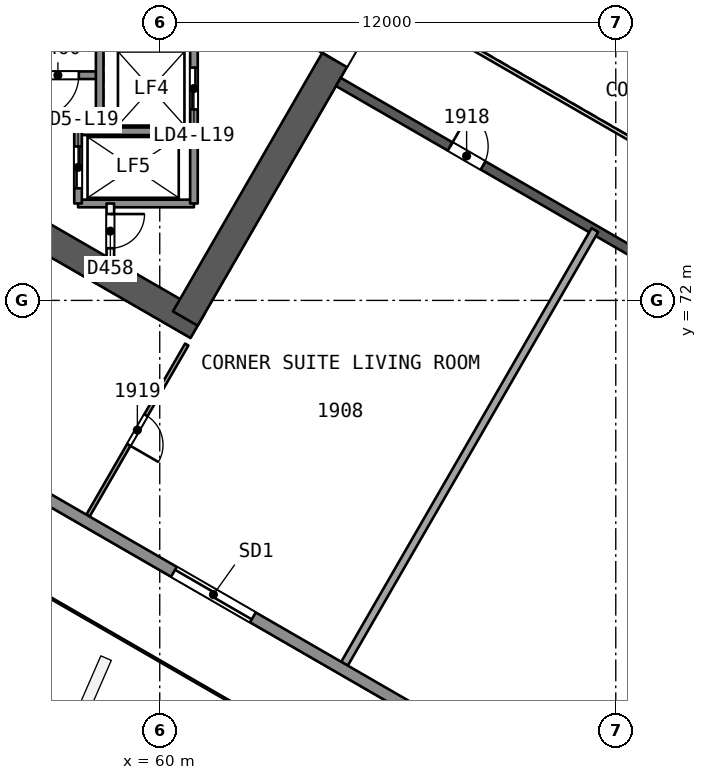
"""IFC4 building model, lengths in metres.
Left out: names, types, materials, properties, quantities, classifications, styles, units other than length and angle.
Written with IfcOpenShell. Run it as: python <this file> out.ifc"""

import sys

from ifc_helpers import new_model, si_unit, direction, frame, frame_2d, origin, place, context, subcontext, project, spatial, rectangle, extrude, element, fill, save


model = new_model("IFC4")
c1 = context("Model", 3, precision=1e-05, world=origin(), true_north=direction((0.0, 1.0)))
c2 = subcontext(c1, "Body", "Model", "MODEL_VIEW")
j1 = project(units=[si_unit("LENGTHUNIT", "METRE"), si_unit("PLANEANGLEUNIT", "RADIAN")], contexts=[c1])
p1 = place(None, origin())
s1 = spatial("IfcSite", under=j1, at=p1, CompositionType="ELEMENT")
p2 = place(p1, origin())
s2 = spatial("IfcBuilding", under=s1, at=p2, CompositionType="ELEMENT")
p3 = place(p2, frame((0.0, 0.0, 83.2)))
s3 = spatial("IfcBuildingStorey", under=s2, at=p3, CompositionType="ELEMENT", Elevation=83.2)
p4 = place(p3, frame((48.772, 78.394, 0.0), z_axis=(0.0, 0.0, 1.0), x_axis=(0.866028339916, -0.499994914436, 0.0)))
e1 = element("IfcWall", 1, at=p4, inside=s3, PredefinedType="SHEAR", context=c2, shape_type="SweptSolid", body=[
    extrude(rectangle(XDim=14.117, YDim=0.75, at=frame_2d((7.059, 0.0))), origin(), (0.0, 0.0, 1.0), 3.7),
])
p5 = place(p3, frame((60.673, 71.523, 0.0), z_axis=(0.0, 0.0, 1.0), x_axis=(0.499997052475, 0.866027105532, 0.0)))
e2 = element("IfcWall", 2, at=p5, inside=s3, PredefinedType="SHEAR", context=c2, shape_type="SweptSolid", body=[
    extrude(rectangle(XDim=10.005, YDim=0.75, at=frame_2d((5.002, 0.0))), origin(), (0.0, 0.0, 1.0), 3.7),
])
p6 = place(p5, frame((7.855, 0.0, 0.0)))
e3 = element("IfcOpeningElement", 3, at=p6, cuts=e2, PredefinedType="OPENING", context=c2, shape_type="SweptSolid", body=[
    extrude(rectangle(XDim=1.2, YDim=2.1, at=frame_2d((0.6, 1.05))), frame((0.0, 0.385, 0.0), z_axis=(0.0, -1.0, 0.0), x_axis=(1.0, 0.0, 0.0)), (0.0, 0.0, 1.0), 0.771),
])
p7 = place(p3, frame((64.7, 77.748, 0.0), z_axis=(0.0, 0.0, 1.0), x_axis=(0.866026492143, -0.499998114903, 0.0)))
e4 = element("IfcWall", 4, at=p7, inside=s3, PredefinedType="SHEAR", context=c2, shape_type="SweptSolid", body=[
    extrude(rectangle(XDim=15.588, YDim=0.25, at=frame_2d((7.794, 0.0))), origin(), (0.0, 0.0, 1.0), 3.2),
])
p8 = place(p7, frame((3.397, 0.0, 0.0)))
e5 = element("IfcOpeningElement", 5, at=p8, cuts=e4, PredefinedType="OPENING", context=c2, shape_type="SweptSolid", body=[
    extrude(rectangle(XDim=1.0, YDim=2.1, at=frame_2d((0.5, 1.05))), frame((0.0, 0.135, 0.0), z_axis=(0.0, -1.0, 0.0), x_axis=(1.0, 0.0, 0.0)), (0.0, 0.0, 1.0), 0.271),
])
p9 = place(p7, frame((9.091, 0.0, 0.0)))
e6 = element("IfcOpeningElement", 6, at=p9, cuts=e4, PredefinedType="OPENING", context=c2, shape_type="SweptSolid", body=[
    extrude(rectangle(XDim=1.0, YDim=2.1, at=frame_2d((0.5, 1.05))), frame((0.0, 0.135, 0.0), z_axis=(0.0, -1.0, 0.0), x_axis=(1.0, 0.0, 0.0)), (0.0, 0.0, 1.0), 0.271),
])
p10 = place(p3, frame((60.71, 70.838, 0.0), z_axis=(0.0, 0.0, 1.0), x_axis=(-0.499973171224, -0.866040892832, 0.0)))
e7 = element("IfcWall", 7, at=p10, inside=s3, PredefinedType="PARTITIONING", context=c2, shape_type="SweptSolid", body=[
    extrude(rectangle(XDim=5.198, YDim=0.1, at=frame_2d((2.599, 0.0))), origin(), (0.0, 0.0, 1.0), 3.2),
])
p11 = place(p10, frame((2.149, 0.0, 0.0)))
e8 = element("IfcOpeningElement", 8, at=p11, cuts=e7, PredefinedType="OPENING", context=c2, shape_type="SweptSolid", body=[
    extrude(rectangle(XDim=0.9, YDim=2.1, at=frame_2d((0.45, 1.05))), frame((0.0, 0.061, 0.0), z_axis=(0.0, -1.0, 0.0), x_axis=(1.0, 0.0, 0.0)), (0.0, 0.0, 1.0), 0.121),
])
p12 = place(p3, frame((64.862, 62.44, 0.0), z_axis=(0.0, 0.0, 1.0), x_axis=(0.499992964734, 0.866029465559, 0.0)))
e9 = element("IfcWall", 9, at=p12, inside=s3, PredefinedType="PARTITIONING", context=c2, shape_type="SweptSolid", body=[
    extrude(rectangle(XDim=13.177, YDim=0.2, at=frame_2d((6.588, 0.0))), origin(), (0.0, 0.0, 1.0), 3.2),
])
p13 = place(p3, frame((90.221, 47.626, 0.0), z_axis=(0.0, 0.0, 1.0), x_axis=(-0.866025832118, 0.499999258104, 0.0)))
e10 = element("IfcWall", 10, at=p13, inside=s3, PredefinedType="SOLIDWALL", context=c2, shape_type="SweptSolid", body=[
    extrude(rectangle(XDim=58.737, YDim=0.3, at=frame_2d((29.368, 0.0))), origin(), (0.0, 0.0, 1.0), 3.2),
])
p14 = place(p13, frame((32.065, 0.0, 0.0)))
e11 = element("IfcOpeningElement", 11, at=p14, cuts=e10, PredefinedType="OPENING", context=c2, shape_type="SweptSolid", body=[
    extrude(rectangle(XDim=2.4, YDim=2.4, at=frame_2d((1.2, 1.2))), frame((0.0, 0.161, 0.0), z_axis=(0.0, -1.0, 0.0), x_axis=(1.0, 0.0, 0.0)), (0.0, 0.0, 1.0), 0.321),
])
p15 = place(p13, frame((45.575, 0.0, 0.0)))
e12 = element("IfcOpeningElement", 12, at=p15, cuts=e10, PredefinedType="OPENING", context=c2, shape_type="SweptSolid", body=[
    extrude(rectangle(XDim=2.4, YDim=2.4, at=frame_2d((1.2, 1.2))), frame((0.0, 0.161, 0.0), z_axis=(0.0, -1.0, 0.0), x_axis=(1.0, 0.0, 0.0)), (0.0, 0.0, 1.0), 0.321),
])
p16 = place(p13, frame((13.441, 0.0, 0.0)))
e13 = element("IfcOpeningElement", 13, at=p16, cuts=e10, PredefinedType="OPENING", context=c2, shape_type="SweptSolid", body=[
    extrude(rectangle(XDim=2.4, YDim=2.4, at=frame_2d((1.2, 1.2))), frame((0.0, 0.161, 0.0), z_axis=(0.0, -1.0, 0.0), x_axis=(1.0, 0.0, 0.0)), (0.0, 0.0, 1.0), 0.321),
])
p17 = place(p3, frame((58.42, 77.925, 0.0), z_axis=(0.0, 0.0, 1.0), x_axis=(-1.0, 0.0, 0.0)))
e14 = element("IfcWall", 14, at=p17, inside=s3, PredefinedType="SOLIDWALL", context=c2, shape_type="SweptSolid", body=[
    extrude(rectangle(XDim=7.7, YDim=0.2, at=frame_2d((3.85, 0.0))), origin(), (0.0, 0.0, 1.0), 3.2),
])
p18 = place(p17, frame((0.55, 0.0, 0.0)))
e15 = element("IfcOpeningElement", 15, at=p18, cuts=e14, PredefinedType="OPENING", context=c2, shape_type="SweptSolid", body=[
    extrude(rectangle(XDim=1.1, YDim=2.1, at=frame_2d((0.55, 1.05))), frame((0.0, 0.11, 0.0), z_axis=(0.0, -1.0, 0.0), x_axis=(1.0, 0.0, 0.0)), (0.0, 0.0, 1.0), 0.221),
])
for number, where, z_axis, x_axis in (
    (16, (60.9, 76.45, 0.0), (0.0, 0.0, 1.0), (-1.0, 0.0, 0.0)),
    (17, (60.9, 74.55, 0.0), (0.0, 0.0, 1.0), (-1.0, 0.0, 0.0)),
):
    element("IfcWall", number, at=place(p3, frame(where, z_axis=z_axis, x_axis=x_axis)), inside=s3, PredefinedType="SOLIDWALL", context=c2, shape_type="SweptSolid", body=[
        extrude(rectangle(XDim=3.05, YDim=0.2, at=frame_2d((1.525, 0.0))), origin(), (0.0, 0.0, 1.0), 3.2),
    ])
p19 = place(p3, frame((60.9, 85.45, 0.0), z_axis=(0.0, 0.0, 1.0), x_axis=(0.0, -1.0, 0.0)))
e18 = element("IfcWall", 18, at=p19, inside=s3, PredefinedType="SOLIDWALL", context=c2, shape_type="SweptSolid", body=[
    extrude(rectangle(XDim=10.9, YDim=0.2, at=frame_2d((5.45, 0.0))), origin(), (0.0, 0.0, 1.0), 3.2),
])
p20 = place(p19, frame((0.575, 0.0, 0.0)))
e19 = element("IfcOpeningElement", 19, at=p20, cuts=e18, PredefinedType="OPENING", context=c2, shape_type="SweptSolid", body=[
    extrude(rectangle(XDim=1.1, YDim=2.1, at=frame_2d((0.55, 1.05))), frame((0.0, 0.11, 0.0), z_axis=(0.0, -1.0, 0.0), x_axis=(1.0, 0.0, 0.0)), (0.0, 0.0, 1.0), 0.221),
])
p21 = place(p19, frame((2.825, 0.0, 0.0)))
e20 = element("IfcOpeningElement", 20, at=p21, cuts=e18, PredefinedType="OPENING", context=c2, shape_type="SweptSolid", body=[
    extrude(rectangle(XDim=1.1, YDim=2.1, at=frame_2d((0.55, 1.05))), frame((0.0, 0.11, 0.0), z_axis=(0.0, -1.0, 0.0), x_axis=(1.0, 0.0, 0.0)), (0.0, 0.0, 1.0), 0.221),
])
p22 = place(p19, frame((5.075, 0.0, 0.0)))
e21 = element("IfcOpeningElement", 21, at=p22, cuts=e18, PredefinedType="OPENING", context=c2, shape_type="SweptSolid", body=[
    extrude(rectangle(XDim=1.1, YDim=2.1, at=frame_2d((0.55, 1.05))), frame((0.0, 0.11, 0.0), z_axis=(0.0, -1.0, 0.0), x_axis=(1.0, 0.0, 0.0)), (0.0, 0.0, 1.0), 0.221),
])
p23 = place(p19, frame((7.325, 0.0, 0.0)))
e22 = element("IfcOpeningElement", 22, at=p23, cuts=e18, PredefinedType="OPENING", context=c2, shape_type="SweptSolid", body=[
    extrude(rectangle(XDim=1.1, YDim=2.1, at=frame_2d((0.55, 1.05))), frame((0.0, 0.11, 0.0), z_axis=(0.0, -1.0, 0.0), x_axis=(1.0, 0.0, 0.0)), (0.0, 0.0, 1.0), 0.221),
])
p24 = place(p3, frame((58.7, 74.55, 0.0), z_axis=(0.0, 0.0, 1.0), x_axis=(0.0, -1.0, 0.0)))
e23 = element("IfcWall", 23, at=p24, inside=s3, PredefinedType="PARTITIONING", context=c2, shape_type="SweptSolid", body=[
    extrude(rectangle(XDim=1.455, YDim=0.2, at=frame_2d((0.728, 0.0))), origin(), (0.0, 0.0, 1.0), 3.2),
])
p25 = place(p24, frame((0.278, 0.0, 0.0)))
e24 = element("IfcOpeningElement", 24, at=p25, cuts=e23, PredefinedType="OPENING", context=c2, shape_type="SweptSolid", body=[
    extrude(rectangle(XDim=0.9, YDim=2.1, at=frame_2d((0.45, 1.05))), frame((0.0, 0.11, 0.0), z_axis=(0.0, -1.0, 0.0), x_axis=(1.0, 0.0, 0.0)), (0.0, 0.0, 1.0), 0.221),
])
p26 = place(p3, frame((58.42, 85.45, 0.0), z_axis=(0.0, 0.0, 1.0), x_axis=(0.0, -1.0, 0.0)))
e25 = element("IfcWall", 25, at=p26, inside=s3, PredefinedType="SOLIDWALL", context=c2, shape_type="SweptSolid", body=[
    extrude(rectangle(XDim=9.0, YDim=0.2, at=frame_2d((4.5, 0.0))), origin(), (0.0, 0.0, 1.0), 3.2),
])
p27 = place(p3, frame((57.85, 76.45, 0.0), z_axis=(0.0, 0.0, 1.0), x_axis=(0.0, -1.0, 0.0)))
e26 = element("IfcWall", 26, at=p27, inside=s3, PredefinedType="SOLIDWALL", context=c2, shape_type="SweptSolid", body=[
    extrude(rectangle(XDim=1.9, YDim=0.2, at=frame_2d((0.95, 0.0))), origin(), (0.0, 0.0, 1.0), 3.2),
])
p28 = place(p27, frame((0.4, 0.0, 0.0)))
e27 = element("IfcOpeningElement", 27, at=p28, cuts=e26, PredefinedType="OPENING", context=c2, shape_type="SweptSolid", body=[
    extrude(rectangle(XDim=1.1, YDim=2.1, at=frame_2d((0.55, 1.05))), frame((0.0, 0.11, 0.0), z_axis=(0.0, -1.0, 0.0), x_axis=(1.0, 0.0, 0.0)), (0.0, 0.0, 1.0), 0.221),
])
p29 = place(p3, frame((67.702, 78.948, 0.0), z_axis=(0.0, 0.0, 1.0), x_axis=(0.866026658274, -0.499997827154, 0.0)))
e28 = element("IfcWall", 28, at=p29, inside=s3, PredefinedType="PARTITIONING", context=c2, shape_type="SweptSolid", body=[
    extrude(rectangle(XDim=11.588, YDim=0.1, at=frame_2d((5.794, 0.0))), origin(), (0.0, 0.0, 1.0), 3.2),
])
p30 = place(p8, origin())
e29 = element("IfcDoor", 29, at=p30, inside=s3, OperationType="SINGLE_SWING_LEFT", PredefinedType="NOTDEFINED", context=c2, shape_type="SweptSolid", body=[
    extrude(rectangle(XDim=1.0, YDim=2.1, at=frame_2d((0.5, 1.05))), frame((0.0, 0.025, 0.0), z_axis=(0.0, -1.0, 0.0), x_axis=(1.0, 0.0, 0.0)), (0.0, 0.0, 1.0), 0.05),
])
fill(e5, e29)
p31 = place(p11, origin())
e30 = element("IfcDoor", 30, at=p31, inside=s3, OperationType="SINGLE_SWING_RIGHT", PredefinedType="NOTDEFINED", context=c2, shape_type="SweptSolid", body=[
    extrude(rectangle(XDim=0.9, YDim=2.1, at=frame_2d((0.45, 1.05))), frame((0.0, 0.025, 0.0), z_axis=(0.0, -1.0, 0.0), x_axis=(1.0, 0.0, 0.0)), (0.0, 0.0, 1.0), 0.05),
])
fill(e8, e30)
p32 = place(p14, origin())
e31 = element("IfcDoor", 31, at=p32, inside=s3, OperationType="SLIDING_TO_LEFT", PredefinedType="NOTDEFINED", context=c2, shape_type="SweptSolid", body=[
    extrude(rectangle(XDim=2.4, YDim=2.4, at=frame_2d((1.2, 1.2))), frame((0.0, 0.025, 0.0), z_axis=(0.0, -1.0, 0.0), x_axis=(1.0, 0.0, 0.0)), (0.0, 0.0, 1.0), 0.05),
])
fill(e11, e31)
p33 = place(p6, origin())
e32 = element("IfcDoor", 32, at=p33, inside=s3, OperationType="SINGLE_SWING_LEFT", PredefinedType="NOTDEFINED", context=c2, shape_type="SweptSolid", body=[
    extrude(rectangle(XDim=1.2, YDim=2.1, at=frame_2d((0.6, 1.05))), frame((0.0, 0.025, 0.0), z_axis=(0.0, -1.0, 0.0), x_axis=(1.0, 0.0, 0.0)), (0.0, 0.0, 1.0), 0.05),
])
fill(e3, e32)
p34 = place(p23, origin())
e33 = element("IfcDoor", 33, at=p34, inside=s3, OperationType="SLIDING_TO_LEFT", PredefinedType="NOTDEFINED", context=c2, shape_type="SweptSolid", body=[
    extrude(rectangle(XDim=1.1, YDim=2.1, at=frame_2d((0.55, 1.05))), frame((0.0, 0.025, 0.0), z_axis=(0.0, -1.0, 0.0), x_axis=(1.0, 0.0, 0.0)), (0.0, 0.0, 1.0), 0.05),
])
fill(e22, e33)
p35 = place(p28, origin())
e34 = element("IfcDoor", 34, at=p35, inside=s3, OperationType="SLIDING_TO_RIGHT", PredefinedType="NOTDEFINED", context=c2, shape_type="SweptSolid", body=[
    extrude(rectangle(XDim=1.1, YDim=2.1, at=frame_2d((0.55, 1.05))), frame((0.0, 0.025, 0.0), z_axis=(0.0, -1.0, 0.0), x_axis=(1.0, 0.0, 0.0)), (0.0, 0.0, 1.0), 0.05),
])
fill(e27, e34)
p36 = place(p25, origin())
e35 = element("IfcDoor", 35, at=p36, inside=s3, OperationType="SINGLE_SWING_LEFT", PredefinedType="NOTDEFINED", context=c2, shape_type="SweptSolid", body=[
    extrude(rectangle(XDim=0.9, YDim=2.1, at=frame_2d((0.45, 1.05))), frame((0.0, 0.025, 0.0), z_axis=(0.0, -1.0, 0.0), x_axis=(1.0, 0.0, 0.0)), (0.0, 0.0, 1.0), 0.05),
])
fill(e24, e35)
p37 = place(p18, origin())
e36 = element("IfcDoor", 36, at=p37, inside=s3, OperationType="SINGLE_SWING_RIGHT", PredefinedType="NOTDEFINED", context=c2, shape_type="SweptSolid", body=[
    extrude(rectangle(XDim=1.1, YDim=2.1, at=frame_2d((0.55, 1.05))), frame((0.0, 0.025, 0.0), z_axis=(0.0, -1.0, 0.0), x_axis=(1.0, 0.0, 0.0)), (0.0, 0.0, 1.0), 0.05),
])
fill(e15, e36)
save(model, sys.argv[1])
